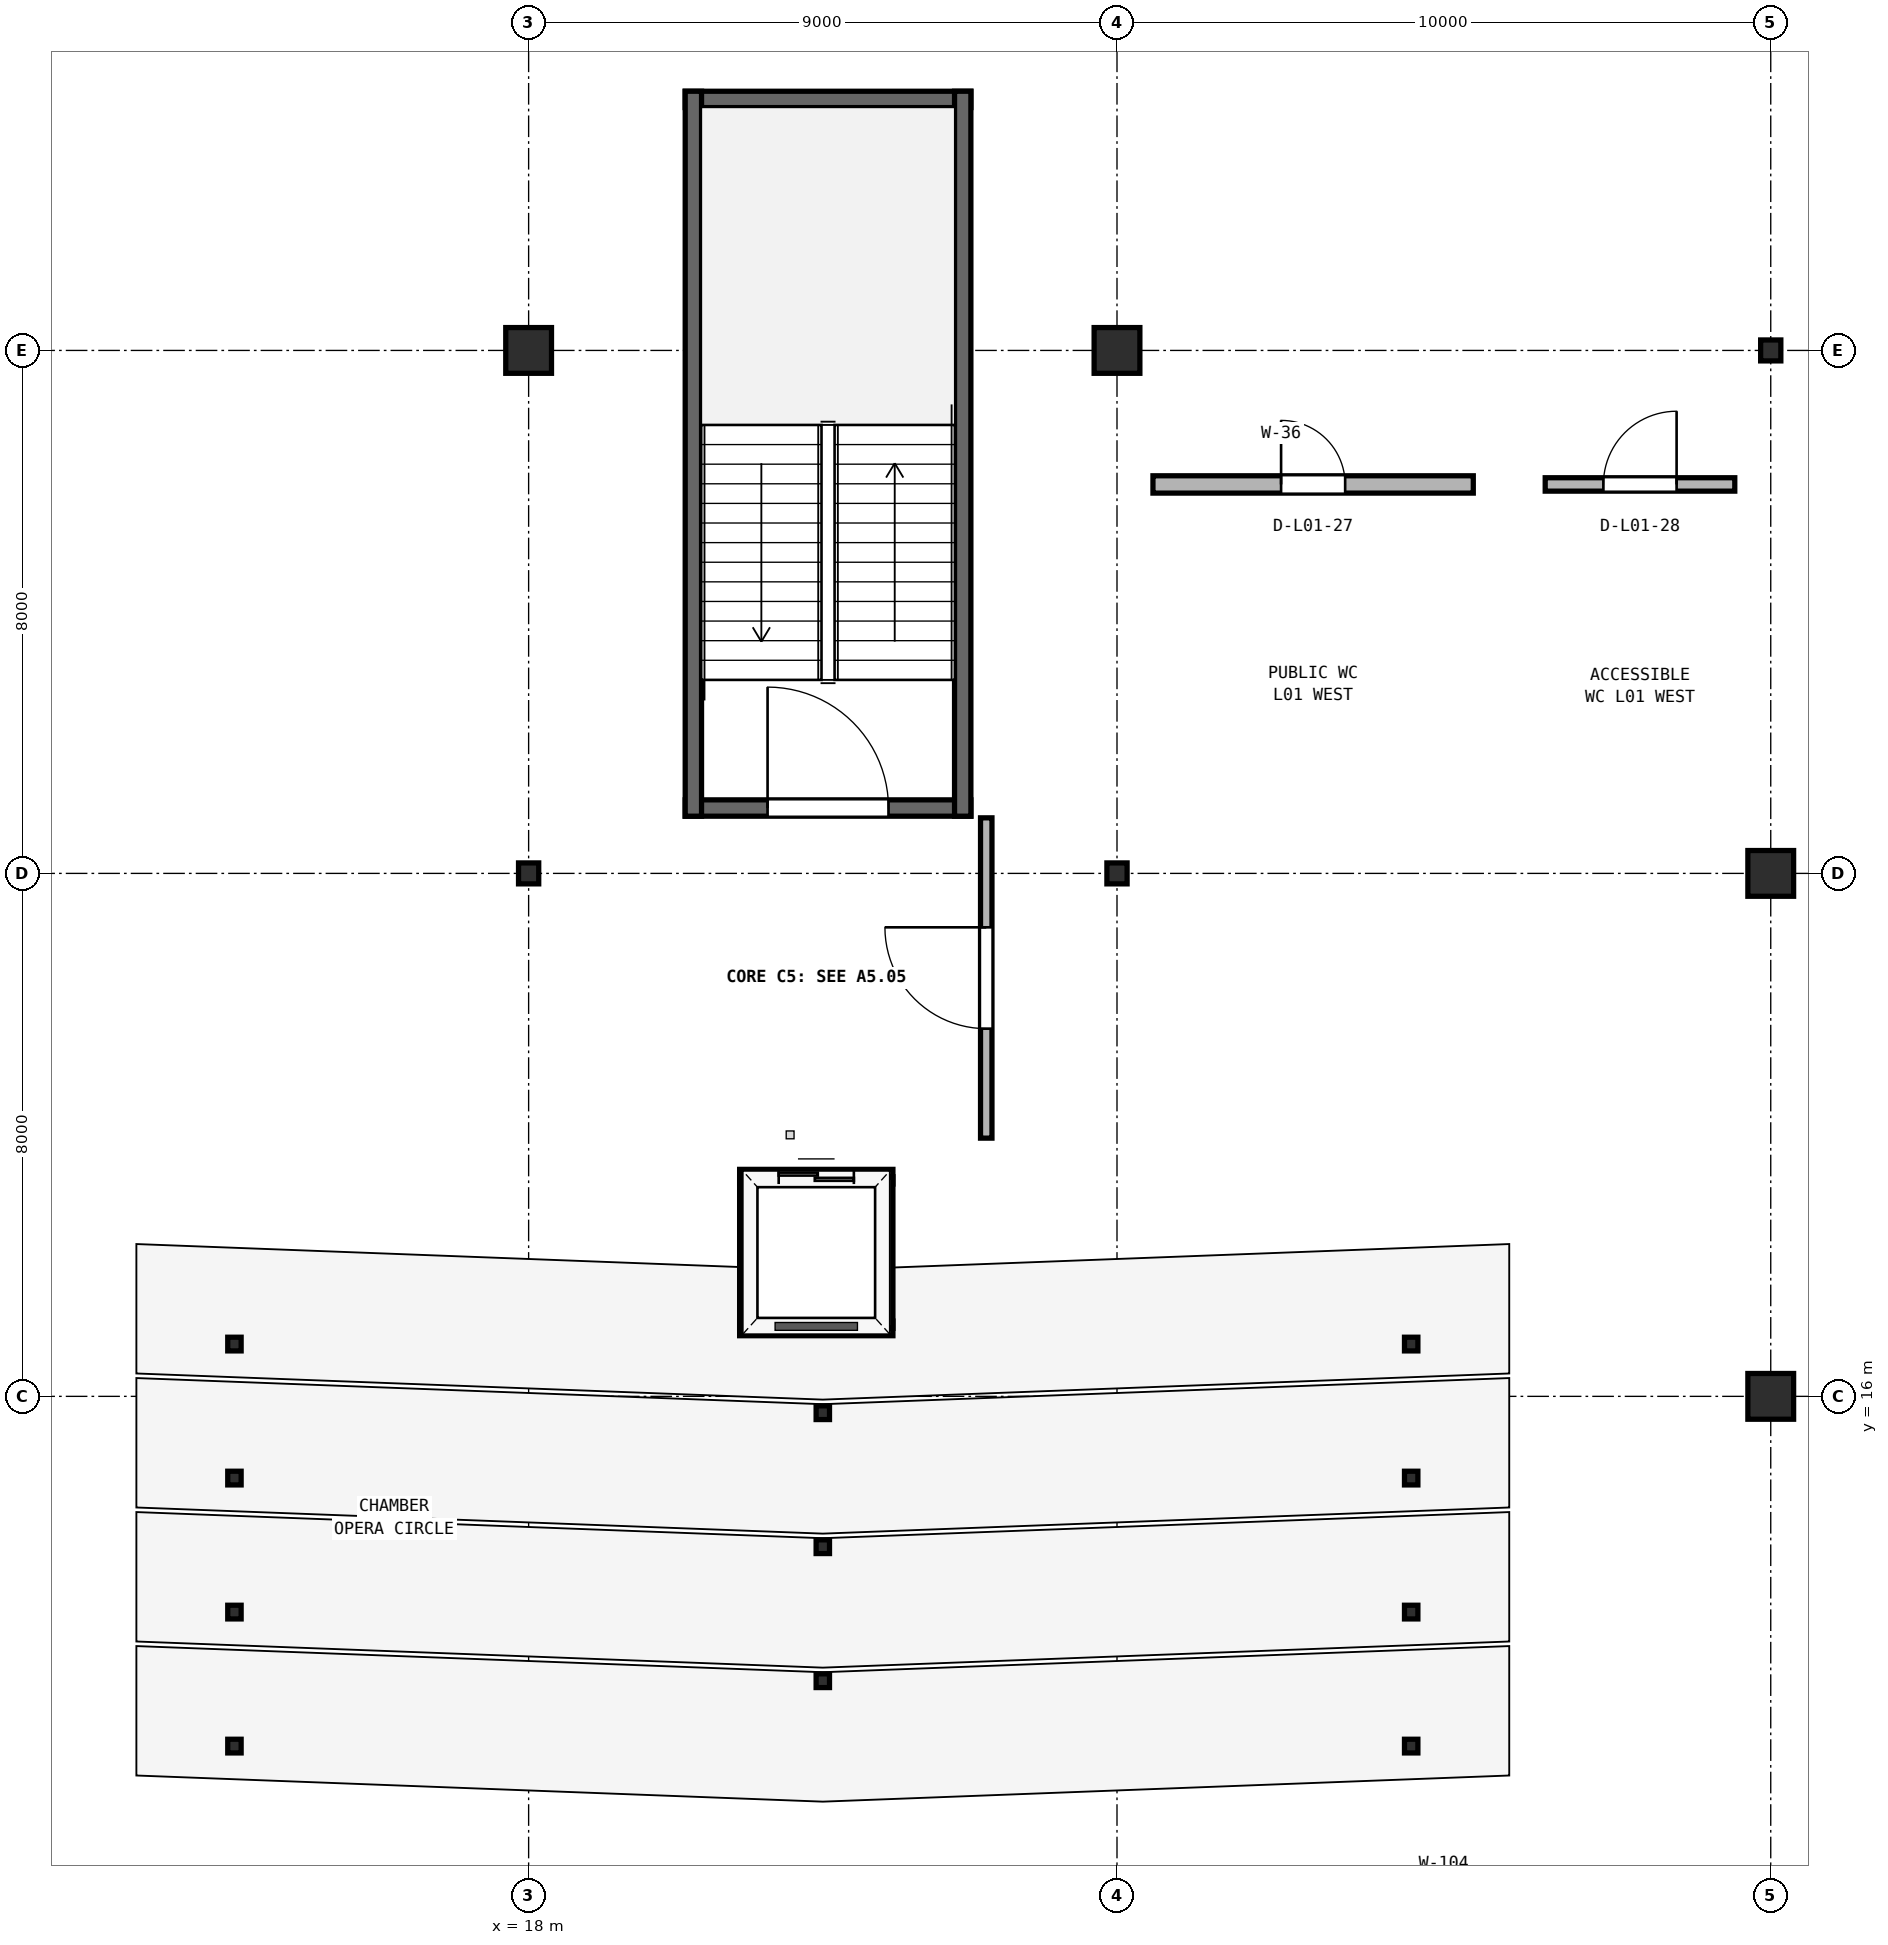
"""IFC4 building model, lengths in metres.
Left out: names, types, materials, properties, quantities, classifications, styles, units other than length and angle.
Written with IfcOpenShell. Run it as: python <this file> out.ifc"""

import sys

from ifc_helpers import new_model, si_unit, direction, frame, frame_2d, origin, origin_2d, place, context, subcontext, project, spatial, rectangle, i_section, extrude, element, fill, save


model = new_model("IFC4")
c1 = context("Model", 3, precision=1e-05, world=origin(), true_north=direction((0.0, 1.0)))
c2 = subcontext(c1, "Body", "Model", "MODEL_VIEW")
j1 = project(units=[si_unit("LENGTHUNIT", "METRE"), si_unit("PLANEANGLEUNIT", "RADIAN")], contexts=[c1])
p1 = place(None, origin())
s1 = spatial("IfcSite", under=j1, at=p1, CompositionType="ELEMENT")
p2 = place(p1, origin())
s2 = spatial("IfcBuilding", under=s1, at=p2, CompositionType="ELEMENT")
p3 = place(p2, frame((0.0, 0.0, 5.4)))
s3 = spatial("IfcBuildingStorey", under=s2, at=p3, CompositionType="ELEMENT", Elevation=5.4)
p4 = place(p3, frame((18.0, 24.0, 0.0), z_axis=(0.0, 0.0, 1.0), x_axis=(1.0, 0.0, 0.0)))
e1 = element("IfcColumn", 1, at=p4, inside=s3, PredefinedType="COLUMN", context=c2, shape_type="SweptSolid", body=[
    extrude(i_section(OverallWidth=0.309, OverallDepth=0.321, WebThickness=0.014, FlangeThickness=0.022, FilletRadius=0.017, at=origin_2d()), origin(), (0.0, 0.0, 1.0), 4.54),
])
p5 = place(p3, frame((18.0, 32.0, 0.0), z_axis=(0.0, 0.0, 1.0), x_axis=(1.0, 0.0, 0.0)))
e2 = element("IfcColumn", 2, at=p5, inside=s3, PredefinedType="COLUMN", context=c2, shape_type="SweptSolid", body=[
    extrude(rectangle(XDim=0.7, YDim=0.7, at=origin_2d()), origin(), (0.0, 0.0, 1.0), 4.54),
])
p6 = place(p3, frame((27.0, 24.0, 0.0), z_axis=(0.0, 0.0, 1.0), x_axis=(1.0, 0.0, 0.0)))
e3 = element("IfcColumn", 3, at=p6, inside=s3, PredefinedType="COLUMN", context=c2, shape_type="SweptSolid", body=[
    extrude(i_section(OverallWidth=0.309, OverallDepth=0.321, WebThickness=0.014, FlangeThickness=0.022, FilletRadius=0.017, at=origin_2d()), origin(), (0.0, 0.0, 1.0), 4.54),
])
for number, where, z_axis, x_axis in (
    (4, (27.0, 32.0, 0.0), (0.0, 0.0, 1.0), (1.0, 0.0, 0.0)),
    (5, (37.0, 16.0, 0.0), (0.0, 0.0, 1.0), (1.0, 0.0, 0.0)),
    (6, (37.0, 24.0, 0.0), (0.0, 0.0, 1.0), (1.0, 0.0, 0.0)),
):
    element("IfcColumn", number, at=place(p3, frame(where, z_axis=z_axis, x_axis=x_axis)), inside=s3, PredefinedType="COLUMN", context=c2, shape_type="SweptSolid", body=[
        extrude(rectangle(XDim=0.7, YDim=0.7, at=origin_2d()), origin(), (0.0, 0.0, 1.0), 4.54),
    ])
p7 = place(p3, frame((37.0, 32.0, 0.0), z_axis=(0.0, 0.0, 1.0), x_axis=(1.0, 0.0, 0.0)))
e7 = element("IfcColumn", 7, at=p7, inside=s3, PredefinedType="COLUMN", context=c2, shape_type="SweptSolid", body=[
    extrude(i_section(OverallWidth=0.309, OverallDepth=0.321, WebThickness=0.014, FlangeThickness=0.022, FilletRadius=0.017, at=origin_2d()), origin(), (0.0, 0.0, 1.0), 4.54),
])
for number, where, z_axis, x_axis in (
    (8, (13.5, 10.65, 0.0), (0.0, 0.0, 1.0), (1.0, 0.0, 0.0)),
    (9, (31.5, 10.65, 0.0), (0.0, 0.0, 1.0), (1.0, 0.0, 0.0)),
    (10, (22.5, 11.65, 0.0), (0.0, 0.0, 1.0), (1.0, 0.0, 0.0)),
):
    element("IfcColumn", number, at=place(p3, frame(where, z_axis=z_axis, x_axis=x_axis)), inside=s3, PredefinedType="COLUMN", context=c2, shape_type="SweptSolid", body=[
        extrude(i_section(OverallWidth=0.205, OverallDepth=0.21, WebThickness=0.009, FlangeThickness=0.014, FilletRadius=0.011, at=origin_2d()), origin(), (0.0, 0.0, 1.0), 0.06),
    ])
for number, where, z_axis, x_axis in (
    (11, (13.5, 12.7, 0.0), (0.0, 0.0, 1.0), (1.0, 0.0, 0.0)),
    (12, (31.5, 12.7, 0.0), (0.0, 0.0, 1.0), (1.0, 0.0, 0.0)),
    (13, (22.5, 13.7, 0.0), (0.0, 0.0, 1.0), (1.0, 0.0, 0.0)),
):
    element("IfcColumn", number, at=place(p3, frame(where, z_axis=z_axis, x_axis=x_axis)), inside=s3, PredefinedType="COLUMN", context=c2, shape_type="SweptSolid", body=[
        extrude(i_section(OverallWidth=0.205, OverallDepth=0.21, WebThickness=0.009, FlangeThickness=0.014, FilletRadius=0.011, at=origin_2d()), origin(), (0.0, 0.0, 1.0), 0.34),
    ])
for number, where, z_axis, x_axis in (
    (14, (13.5, 14.75, 0.0), (0.0, 0.0, 1.0), (1.0, 0.0, 0.0)),
    (15, (31.5, 14.75, 0.0), (0.0, 0.0, 1.0), (1.0, 0.0, 0.0)),
    (16, (22.5, 15.75, 0.0), (0.0, 0.0, 1.0), (1.0, 0.0, 0.0)),
):
    element("IfcColumn", number, at=place(p3, frame(where, z_axis=z_axis, x_axis=x_axis)), inside=s3, PredefinedType="COLUMN", context=c2, shape_type="SweptSolid", body=[
        extrude(i_section(OverallWidth=0.205, OverallDepth=0.21, WebThickness=0.009, FlangeThickness=0.014, FilletRadius=0.011, at=origin_2d()), origin(), (0.0, 0.0, 1.0), 0.62),
    ])
for number, where, z_axis, x_axis in (
    (17, (13.5, 16.8, 0.0), (0.0, 0.0, 1.0), (1.0, 0.0, 0.0)),
    (18, (31.5, 16.8, 0.0), (0.0, 0.0, 1.0), (1.0, 0.0, 0.0)),
    (19, (22.5, 17.8, 0.0), (0.0, 0.0, 1.0), (1.0, 0.0, 0.0)),
):
    element("IfcColumn", number, at=place(p3, frame(where, z_axis=z_axis, x_axis=x_axis)), inside=s3, PredefinedType="COLUMN", context=c2, shape_type="SweptSolid", body=[
        extrude(i_section(OverallWidth=0.205, OverallDepth=0.21, WebThickness=0.009, FlangeThickness=0.014, FilletRadius=0.011, at=origin_2d()), origin(), (0.0, 0.0, 1.0), 0.9),
    ])
p8 = place(p3, frame((20.395, 25.0, 0.0), z_axis=(0.0, 0.0, 1.0), x_axis=(1.0, 0.0, 0.0)))
e20 = element("IfcWall", 20, at=p8, inside=s3, PredefinedType="SHEAR", context=c2, shape_type="SweptSolid", body=[
    extrude(rectangle(XDim=4.37, YDim=0.25, at=frame_2d((2.185, 0.0))), origin(), (0.0, 0.0, 1.0), 4.54),
])
p9 = place(p8, frame((1.26, 0.0, 0.0)))
e21 = element("IfcOpeningElement", 21, at=p9, cuts=e20, PredefinedType="OPENING", context=c2, shape_type="SweptSolid", body=[
    extrude(rectangle(XDim=1.85, YDim=2.25, at=frame_2d((0.925, 1.125))), frame((0.0, 0.135, 0.0), z_axis=(0.0, -1.0, 0.0), x_axis=(1.0, 0.0, 0.0)), (0.0, 0.0, 1.0), 0.27),
])
p10 = place(p3, frame((20.395, 35.84, 0.0), z_axis=(0.0, 0.0, 1.0), x_axis=(1.0, 0.0, 0.0)))
e22 = element("IfcWall", 22, at=p10, inside=s3, PredefinedType="SHEAR", context=c2, shape_type="SweptSolid", body=[
    extrude(rectangle(XDim=4.37, YDim=0.25, at=frame_2d((2.185, 0.0))), origin(), (0.0, 0.0, 1.0), 4.54),
])
for number, where, z_axis, x_axis in (
    (23, (20.52, 24.875, 0.0), (0.0, 0.0, 1.0), (0.0, 1.0, 0.0)),
    (24, (24.64, 24.875, 0.0), (0.0, 0.0, 1.0), (0.0, 1.0, 0.0)),
):
    element("IfcWall", number, at=place(p3, frame(where, z_axis=z_axis, x_axis=x_axis)), inside=s3, PredefinedType="SHEAR", context=c2, shape_type="SweptSolid", body=[
        extrude(rectangle(XDim=11.09, YDim=0.25, at=frame_2d((5.545, 0.0))), origin(), (0.0, 0.0, 1.0), 4.54),
    ])
p11 = place(p3, frame((25.0, 19.95, 0.0), z_axis=(0.0, 0.0, 1.0), x_axis=(0.0, 1.0, 0.0)))
e25 = element("IfcWall", 25, at=p11, inside=s3, PredefinedType="PARTITIONING", context=c2, shape_type="SweptSolid", body=[
    extrude(rectangle(XDim=4.9, YDim=0.175, at=frame_2d((2.45, 0.0))), origin(), (0.0, 0.0, 1.0), 4.49),
])
p12 = place(p11, frame((1.675, 0.0, 0.0)))
e26 = element("IfcOpeningElement", 26, at=p12, cuts=e25, PredefinedType="OPENING", context=c2, shape_type="SweptSolid", body=[
    extrude(rectangle(XDim=1.55, YDim=2.22, at=frame_2d((0.775, 1.11))), frame((0.0, 0.097, 0.0), z_axis=(0.0, -1.0, 0.0), x_axis=(1.0, 0.0, 0.0)), (0.0, 0.0, 1.0), 0.195),
])
p13 = place(p3, frame((21.228, 19.36, 0.0), z_axis=(0.0, 0.0, 1.0), x_axis=(1.0, 0.0, 0.0)))
e27 = element("IfcWall", 27, at=p13, inside=s3, PredefinedType="SOLIDWALL", context=c2, shape_type="SweptSolid", body=[
    extrude(rectangle(XDim=2.345, YDim=0.225, at=frame_2d((1.172, 0.0))), origin(), (0.0, 0.0, 1.0), 4.49),
])
p14 = place(p13, frame((0.597, 0.0, 0.0)))
e28 = element("IfcOpeningElement", 28, at=p14, cuts=e27, PredefinedType="OPENING", context=c2, shape_type="SweptSolid", body=[
    extrude(rectangle(XDim=1.15, YDim=2.2, at=frame_2d((0.575, 1.1))), frame((0.0, 0.123, 0.0), z_axis=(0.0, -1.0, 0.0), x_axis=(1.0, 0.0, 0.0)), (0.0, 0.0, 1.0), 0.245),
])
p15 = place(p3, frame((21.228, 17.04, 0.0), z_axis=(0.0, 0.0, 1.0), x_axis=(1.0, 0.0, 0.0)))
e29 = element("IfcWall", 29, at=p15, inside=s3, PredefinedType="SOLIDWALL", context=c2, shape_type="SweptSolid", body=[
    extrude(rectangle(XDim=2.345, YDim=0.225, at=frame_2d((1.172, 0.0))), origin(), (0.0, 0.0, 1.0), 4.49),
])
for number, where, z_axis, x_axis in (
    (30, (21.34, 17.04, 0.0), (0.0, 0.0, 1.0), (0.0, 1.0, 0.0)),
    (31, (23.46, 17.04, 0.0), (0.0, 0.0, 1.0), (0.0, 1.0, 0.0)),
):
    element("IfcWall", number, at=place(p3, frame(where, z_axis=z_axis, x_axis=x_axis)), inside=s3, PredefinedType="SOLIDWALL", context=c2, shape_type="SweptSolid", body=[
        extrude(rectangle(XDim=2.32, YDim=0.225, at=frame_2d((1.16, 0.0))), origin(), (0.0, 0.0, 1.0), 4.49),
    ])
p16 = place(p3, frame((27.55, 29.95, 0.0), z_axis=(0.0, 0.0, 1.0), x_axis=(1.0, 0.0, 0.0)))
e32 = element("IfcWall", 32, at=p16, inside=s3, PredefinedType="PLUMBINGWALL", context=c2, shape_type="SweptSolid", body=[
    extrude(rectangle(XDim=4.9, YDim=0.265, at=frame_2d((2.45, 0.0))), origin(), (0.0, 0.0, 1.0), 4.49),
])
p17 = place(p16, frame((1.96, 0.0, 0.0)))
e33 = element("IfcOpeningElement", 33, at=p17, cuts=e32, PredefinedType="OPENING", context=c2, shape_type="SweptSolid", body=[
    extrude(rectangle(XDim=0.98, YDim=2.14, at=frame_2d((0.49, 1.07))), frame((0.0, 0.142, 0.0), z_axis=(0.0, -1.0, 0.0), x_axis=(1.0, 0.0, 0.0)), (0.0, 0.0, 1.0), 0.285),
])
p18 = place(p3, frame((33.55, 29.95, 0.0), z_axis=(0.0, 0.0, 1.0), x_axis=(1.0, 0.0, 0.0)))
e34 = element("IfcWall", 34, at=p18, inside=s3, PredefinedType="PLUMBINGWALL", context=c2, shape_type="SweptSolid", body=[
    extrude(rectangle(XDim=2.9, YDim=0.205, at=frame_2d((1.45, 0.0))), origin(), (0.0, 0.0, 1.0), 4.49),
])
p19 = place(p18, frame((0.89, 0.0, 0.0)))
e35 = element("IfcOpeningElement", 35, at=p19, cuts=e34, PredefinedType="OPENING", context=c2, shape_type="SweptSolid", body=[
    extrude(rectangle(XDim=1.12, YDim=2.16, at=frame_2d((0.56, 1.08))), frame((0.0, 0.113, 0.0), z_axis=(0.0, -1.0, 0.0), x_axis=(1.0, 0.0, 0.0)), (0.0, 0.0, 1.0), 0.225),
])
p20 = place(p9, origin())
e36 = element("IfcDoor", 36, at=p20, inside=s3, OperationType="SINGLE_SWING_LEFT", PredefinedType="DOOR", context=c2, shape_type="SweptSolid", body=[
    extrude(rectangle(XDim=1.85, YDim=2.25, at=frame_2d((0.925, 1.125))), frame((0.0, 0.025, 0.0), z_axis=(0.0, -1.0, 0.0), x_axis=(1.0, 0.0, 0.0)), (0.0, 0.0, 1.0), 0.05),
])
fill(e21, e36)
p21 = place(p12, origin())
e37 = element("IfcDoor", 37, at=p21, inside=s3, OperationType="SINGLE_SWING_RIGHT", PredefinedType="DOOR", context=c2, shape_type="SweptSolid", body=[
    extrude(rectangle(XDim=1.55, YDim=2.22, at=frame_2d((0.775, 1.11))), frame((0.0, 0.025, 0.0), z_axis=(0.0, -1.0, 0.0), x_axis=(1.0, 0.0, 0.0)), (0.0, 0.0, 1.0), 0.05),
])
fill(e26, e37)
p22 = place(p14, origin())
e38 = element("IfcDoor", 38, at=p22, inside=s3, OperationType="DOUBLE_DOOR_SLIDING", PredefinedType="DOOR", context=c2, shape_type="SweptSolid", body=[
    extrude(rectangle(XDim=1.15, YDim=2.2, at=frame_2d((0.575, 1.1))), frame((0.0, 0.025, 0.0), z_axis=(0.0, -1.0, 0.0), x_axis=(1.0, 0.0, 0.0)), (0.0, 0.0, 1.0), 0.05),
])
fill(e28, e38)
p23 = place(p17, origin())
e39 = element("IfcDoor", 39, at=p23, inside=s3, OperationType="SINGLE_SWING_LEFT", PredefinedType="DOOR", context=c2, shape_type="SweptSolid", body=[
    extrude(rectangle(XDim=0.98, YDim=2.14, at=frame_2d((0.49, 1.07))), frame((0.0, 0.025, 0.0), z_axis=(0.0, -1.0, 0.0), x_axis=(1.0, 0.0, 0.0)), (0.0, 0.0, 1.0), 0.05),
])
fill(e33, e39)
p24 = place(p19, origin())
e40 = element("IfcDoor", 40, at=p24, inside=s3, OperationType="SINGLE_SWING_RIGHT", PredefinedType="DOOR", context=c2, shape_type="SweptSolid", body=[
    extrude(rectangle(XDim=1.12, YDim=2.16, at=frame_2d((0.56, 1.08))), frame((0.0, 0.025, 0.0), z_axis=(0.0, -1.0, 0.0), x_axis=(1.0, 0.0, 0.0)), (0.0, 0.0, 1.0), 0.05),
])
fill(e35, e40)
save(model, sys.argv[1])
